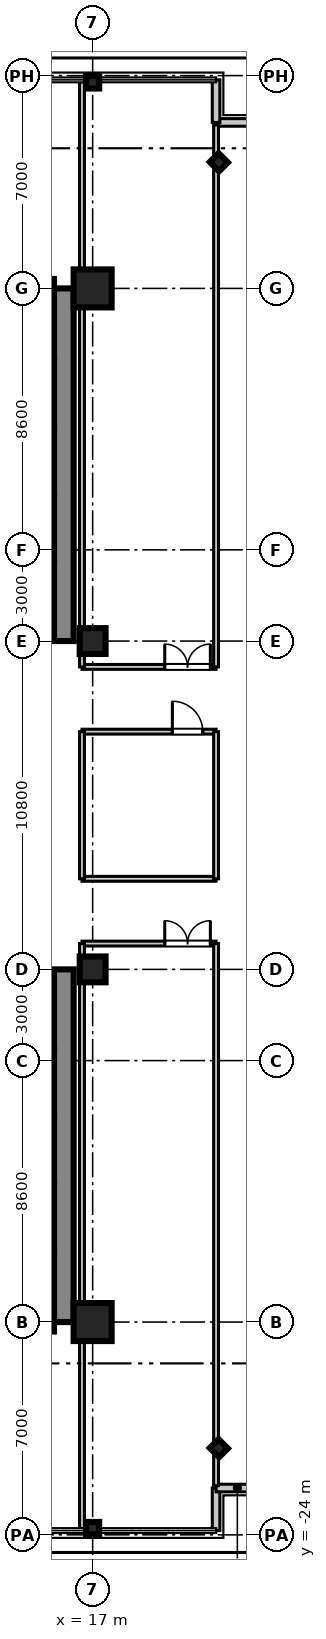
"""IFC4 building model, lengths in metres.
Left out: names, types, materials, properties, quantities, classifications, styles, units other than length and angle.
Written with IfcOpenShell. Run it as: python <this file> out.ifc"""

import sys

from ifc_helpers import new_model, si_unit, direction, frame, frame_2d, origin, origin_2d, place, context, subcontext, project, spatial, rectangle, i_section, extrude, source, transform, mapped, element, fill, save


model = new_model("IFC4")
c1 = context("Model", 3, precision=1e-05, world=origin(), true_north=direction((0.0, 1.0)))
c2 = subcontext(c1, "Body", "Model", "MODEL_VIEW")
j1 = project(units=[si_unit("LENGTHUNIT", "METRE"), si_unit("PLANEANGLEUNIT", "RADIAN")], contexts=[c1])
p1 = place(None, origin())
s1 = spatial("IfcSite", under=j1, at=p1, CompositionType="ELEMENT")
p2 = place(p1, origin())
s2 = spatial("IfcBuilding", under=s1, at=p2, CompositionType="ELEMENT")
p3 = place(p2, frame((0.0, 0.0, 88.3)))
s3 = spatial("IfcBuildingStorey", under=s2, at=p3, CompositionType="ELEMENT", Elevation=88.3)
m1 = source(origin(), c2, "Body", "SweptSolid", [
    extrude(rectangle(XDim=1.25, YDim=1.25, at=origin_2d()), origin(), (0.0, 0.0, 1.0), 3.605),
])
p4 = place(p3, frame((17.0, -17.0, 0.0), z_axis=(0.0, 0.0, 1.0), x_axis=(1.0, 0.0, 0.0)))
e1 = element("IfcColumn", 1, at=p4, inside=s3, PredefinedType="COLUMN", context=c2, shape_type="MappedRepresentation", body=[
    mapped(m1, transform((0.0, 0.0, 0.0), scale=1.0)),
])
m2 = source(origin(), c2, "Body", "SweptSolid", [
    extrude(rectangle(XDim=0.85, YDim=0.85, at=origin_2d()), origin(), (0.0, 0.0, 1.0), 3.605),
])
for number, where, z_axis, x_axis in (
    (2, (17.0, -5.4, 0.0), (0.0, 0.0, 1.0), (1.0, 0.0, 0.0)),
    (3, (17.0, 5.4, 0.0), (0.0, 0.0, 1.0), (1.0, 0.0, 0.0)),
):
    element("IfcColumn", number, at=place(p3, frame(where, z_axis=z_axis, x_axis=x_axis)), inside=s3, PredefinedType="PILASTER", context=c2, shape_type="MappedRepresentation", body=[
        mapped(m2, transform((0.0, 0.0, 0.0), scale=1.0)),
    ])
p5 = place(p3, frame((17.0, 17.0, 0.0), z_axis=(0.0, 0.0, 1.0), x_axis=(1.0, 0.0, 0.0)))
e4 = element("IfcColumn", 4, at=p5, inside=s3, PredefinedType="COLUMN", context=c2, shape_type="MappedRepresentation", body=[
    mapped(m1, transform((0.0, 0.0, 0.0), scale=1.0)),
])
m3 = source(origin(), c2, "Body", "SweptSolid", [
    extrude(i_section(OverallWidth=0.409, OverallDepth=0.43, WebThickness=0.021, FlangeThickness=0.034, at=origin_2d()), origin(), (0.0, 0.0, 1.0), 3.605),
])
for number, where, z_axis, x_axis in (
    (5, (17.0, -23.78, 0.0), (0.0, 0.0, 1.0), (0.0, 1.0, 0.0)),
    (6, (17.0, 23.78, 0.0), (0.0, 0.0, 1.0), (0.0, 1.0, 0.0)),
    (7, (21.15, -21.15, 0.0), (0.0, 0.0, 1.0), (0.707, 0.707, 0.0)),
    (8, (21.15, 21.15, 0.0), (0.0, 0.0, 1.0), (0.707, 0.707, 0.0)),
):
    element("IfcColumn", number, at=place(p3, frame(where, z_axis=z_axis, x_axis=x_axis)), inside=s3, PredefinedType="COLUMN", context=c2, shape_type="MappedRepresentation", body=[
        mapped(m3, transform((0.0, 0.0, 0.0), scale=1.0)),
    ])
m4 = source(origin(), c2, "Body", "SweptSolid", [
    extrude(rectangle(XDim=11.6, YDim=0.65, at=frame_2d((5.8, 0.0))), origin(), (0.0, 0.0, 1.0), 3.38),
])
for number, where, z_axis, x_axis in (
    (9, (16.05, 5.4, 0.0), (0.0, 0.0, 1.0), (0.0, 1.0, 0.0)),
    (10, (16.05, -17.0, 0.0), (0.0, 0.0, 1.0), (0.0, 1.0, 0.0)),
):
    element("IfcWall", number, at=place(p3, frame(where, z_axis=z_axis, x_axis=x_axis)), inside=s3, PredefinedType="SHEAR", context=c2, shape_type="MappedRepresentation", body=[
        mapped(m4, transform((0.0, 0.0, 0.0), scale=1.0)),
    ])
m5 = source(origin(), c2, "Body", "SweptSolid", [
    extrude(rectangle(XDim=2.36, YDim=0.22, at=frame_2d((1.18, 0.0))), origin(), (0.0, 0.0, 1.0), 3.38),
])
p6 = place(p3, frame((15.62, 5.64, 0.0), z_axis=(0.0, 0.0, 1.0), x_axis=(0.0, 1.0, 0.0)))
e11 = element("IfcWall", 11, at=p6, inside=s3, PredefinedType="SHEAR", context=c2, shape_type="MappedRepresentation", body=[
    mapped(m5, transform((0.0, 0.0, 0.0), scale=1.0)),
])
m6 = source(origin(), c2, "Body", "SweptSolid", [
    extrude(rectangle(XDim=2.2, YDim=0.22, at=frame_2d((1.1, 0.0))), origin(), (0.0, 0.0, 1.0), 3.38),
])
for number, where, z_axis, x_axis in (
    (12, (15.62, 8.0, 0.0), (0.0, 0.0, 1.0), (0.0, 1.0, 0.0)),
    (13, (15.62, 10.2, 0.0), (0.0, 0.0, 1.0), (0.0, 1.0, 0.0)),
):
    element("IfcWall", number, at=place(p3, frame(where, z_axis=z_axis, x_axis=x_axis)), inside=s3, PredefinedType="SHEAR", context=c2, shape_type="MappedRepresentation", body=[
        mapped(m6, transform((0.0, 0.0, 0.0), scale=1.0)),
    ])
m7 = source(origin(), c2, "Body", "SweptSolid", [
    extrude(rectangle(XDim=2.3, YDim=0.22, at=frame_2d((1.15, 0.0))), origin(), (0.0, 0.0, 1.0), 3.38),
])
p7 = place(p3, frame((15.62, 12.4, 0.0), z_axis=(0.0, 0.0, 1.0), x_axis=(0.0, 1.0, 0.0)))
e14 = element("IfcWall", 14, at=p7, inside=s3, PredefinedType="SHEAR", context=c2, shape_type="MappedRepresentation", body=[
    mapped(m7, transform((0.0, 0.0, 0.0), scale=1.0)),
])
p8 = place(p3, frame((15.62, -8.0, 0.0), z_axis=(0.0, 0.0, 1.0), x_axis=(0.0, 1.0, 0.0)))
e15 = element("IfcWall", 15, at=p8, inside=s3, PredefinedType="SHEAR", context=c2, shape_type="MappedRepresentation", body=[
    mapped(m5, transform((0.0, 0.0, 0.0), scale=1.0)),
])
for number, where, z_axis, x_axis in (
    (16, (15.62, -10.2, 0.0), (0.0, 0.0, 1.0), (0.0, 1.0, 0.0)),
    (17, (15.62, -12.4, 0.0), (0.0, 0.0, 1.0), (0.0, 1.0, 0.0)),
):
    element("IfcWall", number, at=place(p3, frame(where, z_axis=z_axis, x_axis=x_axis)), inside=s3, PredefinedType="SHEAR", context=c2, shape_type="MappedRepresentation", body=[
        mapped(m6, transform((0.0, 0.0, 0.0), scale=1.0)),
    ])
p9 = place(p3, frame((15.62, -14.7, 0.0), z_axis=(0.0, 0.0, 1.0), x_axis=(0.0, 1.0, 0.0)))
e18 = element("IfcWall", 18, at=p9, inside=s3, PredefinedType="SHEAR", context=c2, shape_type="MappedRepresentation", body=[
    mapped(m7, transform((0.0, 0.0, 0.0), scale=1.0)),
])
m8 = source(origin(), c2, "Body", "SweptSolid", [
    extrude(rectangle(XDim=2.61, YDim=0.22, at=frame_2d((1.305, 0.0))), origin(), (0.0, 0.0, 1.0), 3.38),
])
for number, where, z_axis, x_axis in (
    (19, (15.62, 14.7, 0.0), (0.0, 0.0, 1.0), (0.0, 1.0, 0.0)),
    (20, (15.62, -17.31, 0.0), (0.0, 0.0, 1.0), (0.0, 1.0, 0.0)),
):
    element("IfcWall", number, at=place(p3, frame(where, z_axis=z_axis, x_axis=x_axis)), inside=s3, PredefinedType="SHEAR", context=c2, shape_type="MappedRepresentation", body=[
        mapped(m8, transform((0.0, 0.0, 0.0), scale=1.0)),
    ])
m9 = source(origin(), c2, "Body", "SweptSolid", [
    extrude(rectangle(XDim=1.4, YDim=0.25, at=frame_2d((0.7, 0.0))), origin(), (0.0, 0.0, 1.0), 3.38),
])
p10 = place(p3, frame((21.06, -23.86, 0.0), z_axis=(0.0, 0.0, 1.0), x_axis=(0.0, 1.0, 0.0)))
e21 = element("IfcWall", 21, at=p10, inside=s3, PredefinedType="STANDARD", context=c2, shape_type="MappedRepresentation", body=[
    mapped(m9, transform((0.0, 0.0, 0.0), scale=1.0)),
])
m10 = source(origin(), c2, "Body", "SweptSolid", [
    extrude(rectangle(XDim=1.4, YDim=0.25, at=frame_2d((0.7, 0.0))), origin(), (0.0, 0.0, 1.0), 3.38),
])
for number, where, z_axis, x_axis in (
    (22, (21.06, -22.46, 0.0), (0.0, 0.0, 1.0), (1.0, 0.0, 0.0)),
    (23, (21.06, 22.46, 0.0), (0.0, 0.0, 1.0), (1.0, 0.0, 0.0)),
):
    element("IfcWall", number, at=place(p3, frame(where, z_axis=z_axis, x_axis=x_axis)), inside=s3, PredefinedType="STANDARD", context=c2, shape_type="MappedRepresentation", body=[
        mapped(m10, transform((0.0, 0.0, 0.0), scale=1.0)),
    ])
p11 = place(p3, frame((21.06, 22.46, 0.0), z_axis=(0.0, 0.0, 1.0), x_axis=(0.0, 1.0, 0.0)))
e24 = element("IfcWall", 24, at=p11, inside=s3, PredefinedType="STANDARD", context=c2, shape_type="MappedRepresentation", body=[
    mapped(m9, transform((0.0, 0.0, 0.0), scale=1.0)),
])
m11 = source(origin(), c2, "Body", "SweptSolid", [
    extrude(rectangle(XDim=4.41, YDim=0.16, at=frame_2d((2.205, 0.0))), origin(), (0.0, 0.0, 1.0), 2.72),
])
p12 = place(p3, frame((16.65, 4.55, 0.0), z_axis=(0.0, 0.0, 1.0), x_axis=(1.0, 0.0, 0.0)))
e25 = element("IfcWall", 25, at=p12, inside=s3, PredefinedType="PARTITIONING", context=c2, shape_type="MappedRepresentation", body=[
    mapped(m11, transform((0.0, 0.0, 0.0), scale=1.0)),
])
p13 = place(p12, frame((2.722, 0.0, 0.0)))
e26 = element("IfcOpeningElement", 26, at=p13, cuts=e25, PredefinedType="OPENING", context=c2, shape_type="SweptSolid", body=[
    extrude(rectangle(XDim=1.5, YDim=2.15, at=frame_2d((0.75, 1.075))), frame((0.0, 0.09, 0.0), z_axis=(0.0, -1.0, 0.0), x_axis=(1.0, 0.0, 0.0)), (0.0, 0.0, 1.0), 0.18),
])
m12 = source(origin(), c2, "Body", "SweptSolid", [
    extrude(rectangle(XDim=19.25, YDim=0.16, at=frame_2d((9.625, 0.0))), origin(), (0.0, 0.0, 1.0), 2.72),
])
p14 = place(p3, frame((16.65, 4.55, 0.0), z_axis=(0.0, 0.0, 1.0), x_axis=(0.0, 1.0, 0.0)))
e27 = element("IfcWall", 27, at=p14, inside=s3, PredefinedType="PARTITIONING", context=c2, shape_type="MappedRepresentation", body=[
    mapped(m12, transform((0.0, 0.0, 0.0), scale=1.0)),
])
m13 = source(origin(), c2, "Body", "SweptSolid", [
    extrude(rectangle(XDim=17.83, YDim=0.16, at=frame_2d((8.915, 0.0))), origin(), (0.0, 0.0, 1.0), 2.72),
])
p15 = place(p3, frame((21.06, 4.55, 0.0), z_axis=(0.0, 0.0, 1.0), x_axis=(0.0, 1.0, 0.0)))
e28 = element("IfcWall", 28, at=p15, inside=s3, PredefinedType="PARTITIONING", context=c2, shape_type="MappedRepresentation", body=[
    mapped(m13, transform((0.0, 0.0, 0.0), scale=1.0)),
])
p16 = place(p3, frame((16.65, -4.55, 0.0), z_axis=(0.0, 0.0, 1.0), x_axis=(1.0, 0.0, 0.0)))
e29 = element("IfcWall", 29, at=p16, inside=s3, PredefinedType="PARTITIONING", context=c2, shape_type="MappedRepresentation", body=[
    mapped(m11, transform((0.0, 0.0, 0.0), scale=1.0)),
])
p17 = place(p16, frame((2.722, 0.0, 0.0)))
e30 = element("IfcOpeningElement", 30, at=p17, cuts=e29, PredefinedType="OPENING", context=c2, shape_type="SweptSolid", body=[
    extrude(rectangle(XDim=1.5, YDim=2.15, at=frame_2d((0.75, 1.075))), frame((0.0, 0.09, 0.0), z_axis=(0.0, -1.0, 0.0), x_axis=(1.0, 0.0, 0.0)), (0.0, 0.0, 1.0), 0.18),
])
p18 = place(p3, frame((16.65, -23.8, 0.0), z_axis=(0.0, 0.0, 1.0), x_axis=(0.0, 1.0, 0.0)))
e31 = element("IfcWall", 31, at=p18, inside=s3, PredefinedType="PARTITIONING", context=c2, shape_type="MappedRepresentation", body=[
    mapped(m12, transform((0.0, 0.0, 0.0), scale=1.0)),
])
p19 = place(p3, frame((21.06, -22.38, 0.0), z_axis=(0.0, 0.0, 1.0), x_axis=(0.0, 1.0, 0.0)))
e32 = element("IfcWall", 32, at=p19, inside=s3, PredefinedType="PARTITIONING", context=c2, shape_type="MappedRepresentation", body=[
    mapped(m13, transform((0.0, 0.0, 0.0), scale=1.0)),
])
p20 = place(p3, frame((16.65, -2.42, 0.0), z_axis=(0.0, 0.0, 1.0), x_axis=(1.0, 0.0, 0.0)))
e33 = element("IfcWall", 33, at=p20, inside=s3, PredefinedType="PARTITIONING", context=c2, shape_type="MappedRepresentation", body=[
    mapped(m11, transform((0.0, 0.0, 0.0), scale=1.0)),
])
p21 = place(p3, frame((16.65, 2.42, 0.0), z_axis=(0.0, 0.0, 1.0), x_axis=(1.0, 0.0, 0.0)))
e34 = element("IfcWall", 34, at=p21, inside=s3, PredefinedType="PARTITIONING", context=c2, shape_type="MappedRepresentation", body=[
    mapped(m11, transform((0.0, 0.0, 0.0), scale=1.0)),
])
p22 = place(p21, frame((2.972, 0.0, 0.0)))
e35 = element("IfcOpeningElement", 35, at=p22, cuts=e34, PredefinedType="OPENING", context=c2, shape_type="SweptSolid", body=[
    extrude(rectangle(XDim=1.0, YDim=2.1, at=frame_2d((0.5, 1.05))), frame((0.0, 0.09, 0.0), z_axis=(0.0, -1.0, 0.0), x_axis=(1.0, 0.0, 0.0)), (0.0, 0.0, 1.0), 0.18),
])
m14 = source(origin(), c2, "Body", "SweptSolid", [
    extrude(rectangle(XDim=4.84, YDim=0.16, at=frame_2d((2.42, 0.0))), origin(), (0.0, 0.0, 1.0), 2.72),
])
for number, where, z_axis, x_axis in (
    (36, (16.65, -2.42, 0.0), (0.0, 0.0, 1.0), (0.0, 1.0, 0.0)),
    (37, (21.06, -2.42, 0.0), (0.0, 0.0, 1.0), (0.0, 1.0, 0.0)),
):
    element("IfcWall", number, at=place(p3, frame(where, z_axis=z_axis, x_axis=x_axis)), inside=s3, PredefinedType="PARTITIONING", context=c2, shape_type="MappedRepresentation", body=[
        mapped(m14, transform((0.0, 0.0, 0.0), scale=1.0)),
    ])
m15 = source(origin(), c2, "Body", "SweptSolid", [
    extrude(rectangle(XDim=1.5, YDim=2.15, at=frame_2d((0.75, 1.075))), frame((0.0, 0.025, 0.0), z_axis=(0.0, -1.0, 0.0), x_axis=(1.0, 0.0, 0.0)), (0.0, 0.0, 1.0), 0.05),
])
p23 = place(p13, origin())
e38 = element("IfcDoor", 38, at=p23, inside=s3, OperationType="DOUBLE_DOOR_SINGLE_SWING", PredefinedType="DOOR", context=c2, shape_type="MappedRepresentation", body=[
    mapped(m15, transform((0.0, 0.0, 0.0), scale=1.0)),
])
fill(e26, e38)
p24 = place(p17, frame((1.5, 0.0, 0.0), z_axis=(0.0, 0.0, 1.0), x_axis=(-1.0, 0.0, 0.0)))
e39 = element("IfcDoor", 39, at=p24, inside=s3, OperationType="DOUBLE_DOOR_SINGLE_SWING", PredefinedType="DOOR", context=c2, shape_type="MappedRepresentation", body=[
    mapped(m15, transform((0.0, 0.0, 0.0), scale=1.0)),
])
fill(e30, e39)
m16 = source(origin(), c2, "Body", "SweptSolid", [
    extrude(rectangle(XDim=1.0, YDim=2.1, at=frame_2d((0.5, 1.05))), frame((0.0, 0.025, 0.0), z_axis=(0.0, -1.0, 0.0), x_axis=(1.0, 0.0, 0.0)), (0.0, 0.0, 1.0), 0.05),
])
p25 = place(p22, frame((1.0, 0.0, 0.0), z_axis=(0.0, 0.0, 1.0), x_axis=(-1.0, 0.0, 0.0)))
e40 = element("IfcDoor", 40, at=p25, inside=s3, OperationType="SINGLE_SWING_LEFT", PredefinedType="DOOR", context=c2, shape_type="MappedRepresentation", body=[
    mapped(m16, transform((0.0, 0.0, 0.0), scale=1.0)),
])
fill(e35, e40)
save(model, sys.argv[1])
